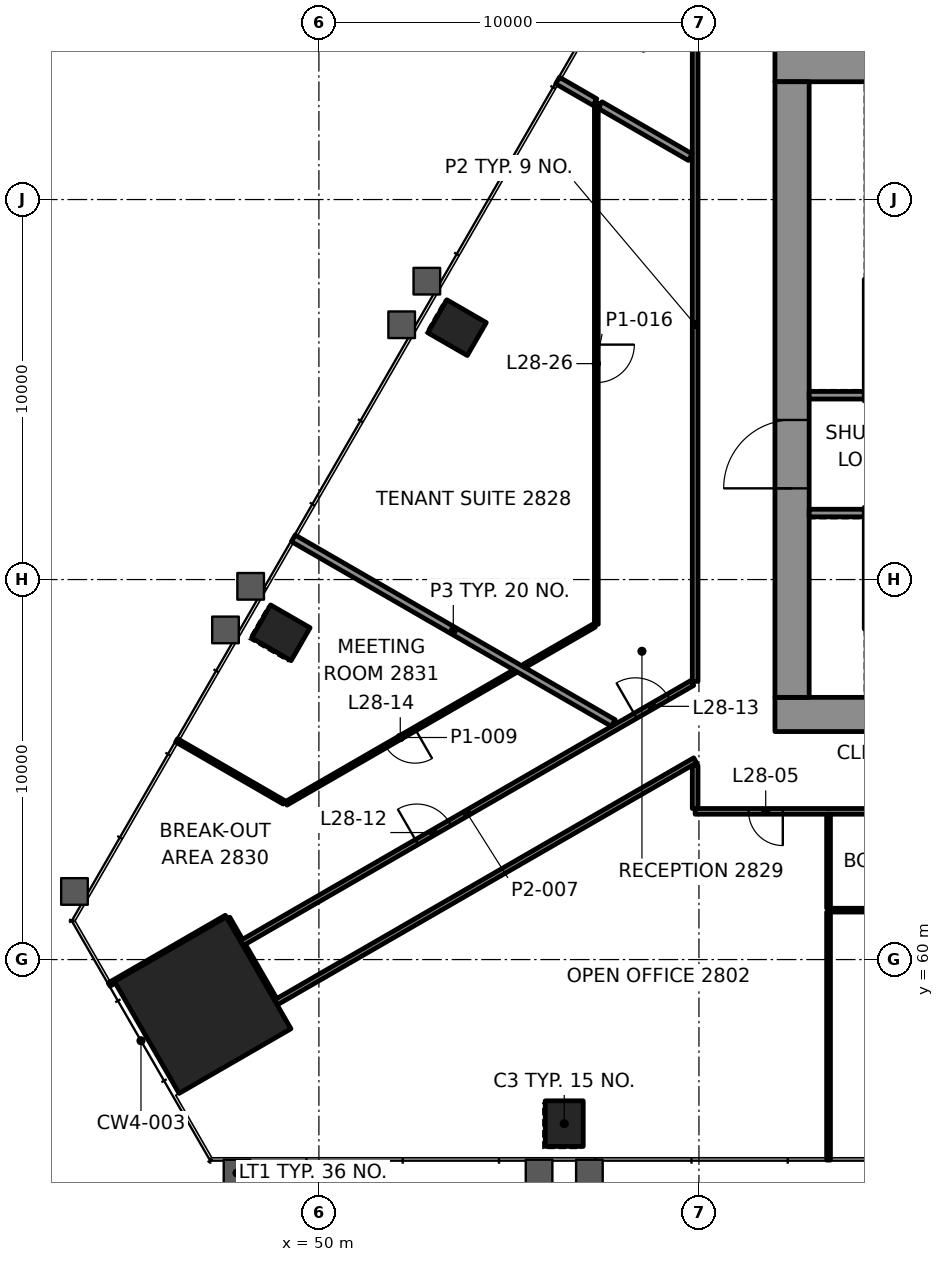
"""IFC4 building model, lengths in metres.
Left out: names, types, materials, properties, quantities, classifications, styles, units other than length and angle.
Written with IfcOpenShell. Run it as: python <this file> out.ifc"""

import sys

from ifc_helpers import new_model, si_unit, direction, frame, frame_2d, origin, origin_2d, place, context, subcontext, project, spatial, rectangle, extrude, element, fill, save


model = new_model("IFC4")
c1 = context("Model", 3, precision=1e-05, world=origin(), true_north=direction((0.0, 1.0)))
c2 = subcontext(c1, "Body", "Model", "MODEL_VIEW")
j1 = project(units=[si_unit("LENGTHUNIT", "METRE"), si_unit("PLANEANGLEUNIT", "RADIAN")], contexts=[c1])
p1 = place(None, origin())
s1 = spatial("IfcSite", under=j1, at=p1, CompositionType="ELEMENT")
p2 = place(p1, origin())
s2 = spatial("IfcBuilding", under=s1, at=p2, CompositionType="ELEMENT")
p3 = place(p2, frame((0.0, 0.0, 124.0)))
s3 = spatial("IfcBuildingStorey", under=s2, at=p3, CompositionType="ELEMENT", Elevation=124.0)
p4 = place(p3, frame((46.942, 58.801, 0.0), z_axis=(0.0, 0.0, 1.0), x_axis=(0.5, -0.866025403784, 0.0)))
e1 = element("IfcColumn", 1, at=p4, inside=s3, PredefinedType="COLUMN", context=c2, shape_type="SweptSolid", body=[
    extrude(rectangle(XDim=3.4, YDim=3.4, at=origin_2d()), origin(), (0.0, 0.0, 1.0), 4.2),
])
for number, where, z_axis, x_axis in (
    (2, (56.455, 55.683, -0.0), (0.0, 0.0, 1.0), (1.0, 0.0, 0.0)),
    (3, (53.635, 76.628, -0.0), (0.0, 0.0, 1.0), (-0.5, -0.866, 0.0)),
    (4, (48.999, 68.598, -0.0), (0.0, 0.0, 1.0), (-0.5, -0.866, 0.0)),
):
    element("IfcColumn", number, at=place(p3, frame(where, z_axis=z_axis, x_axis=x_axis)), inside=s3, PredefinedType="COLUMN", context=c2, shape_type="SweptSolid", body=[
        extrude(rectangle(XDim=1.0, YDim=1.2, at=origin_2d()), origin(), (0.0, 0.0, 1.0), 4.2),
    ])
p5 = place(p3, frame((62.0, 66.45, 0.0), z_axis=(0.0, 0.0, 1.0), x_axis=(1.0, 0.0, 0.0)))
e5 = element("IfcWall", 5, at=p5, inside=s3, PredefinedType="SHEAR", context=c2, shape_type="SweptSolid", body=[
    extrude(rectangle(XDim=26.0, YDim=0.9, at=frame_2d((13.0, 0.0))), origin(), (0.0, 0.0, 1.0), 4.0),
])
p6 = place(p5, frame((3.45, 0.0, 0.0)))
e6 = element("IfcOpeningElement", 6, at=p6, cuts=e5, PredefinedType="OPENING", context=c2, shape_type="SweptSolid", body=[
    extrude(rectangle(XDim=0.9, YDim=2.1, at=frame_2d((0.45, 1.05))), frame((0.0, 0.46, 0.0), z_axis=(0.0, -1.0, 0.0), x_axis=(1.0, 0.0, 0.0)), (0.0, 0.0, 1.0), 0.92),
])
p7 = place(p5, frame((6.425, 0.0, 0.0)))
e7 = element("IfcOpeningElement", 7, at=p7, cuts=e5, PredefinedType="OPENING", context=c2, shape_type="SweptSolid", body=[
    extrude(rectangle(XDim=0.9, YDim=2.1, at=frame_2d((0.45, 1.05))), frame((0.0, 0.46, 0.0), z_axis=(0.0, -1.0, 0.0), x_axis=(1.0, 0.0, 0.0)), (0.0, 0.0, 1.0), 0.92),
])
p8 = place(p5, frame((9.4, 0.0, 0.0)))
e8 = element("IfcOpeningElement", 8, at=p8, cuts=e5, PredefinedType="OPENING", context=c2, shape_type="SweptSolid", body=[
    extrude(rectangle(XDim=0.9, YDim=2.1, at=frame_2d((0.45, 1.05))), frame((0.0, 0.46, 0.0), z_axis=(0.0, -1.0, 0.0), x_axis=(1.0, 0.0, 0.0)), (0.0, 0.0, 1.0), 0.92),
])
p9 = place(p5, frame((14.262, 0.0, 0.0)))
e9 = element("IfcOpeningElement", 9, at=p9, cuts=e5, PredefinedType="OPENING", context=c2, shape_type="SweptSolid", body=[
    extrude(rectangle(XDim=0.9, YDim=2.1, at=frame_2d((0.45, 1.05))), frame((0.0, 0.46, 0.0), z_axis=(0.0, -1.0, 0.0), x_axis=(1.0, 0.0, 0.0)), (0.0, 0.0, 1.0), 0.92),
])
p10 = place(p5, frame((21.188, 0.0, 0.0)))
e10 = element("IfcOpeningElement", 10, at=p10, cuts=e5, PredefinedType="OPENING", context=c2, shape_type="SweptSolid", body=[
    extrude(rectangle(XDim=0.9, YDim=2.1, at=frame_2d((0.45, 1.05))), frame((0.0, 0.46, 0.0), z_axis=(0.0, -1.0, 0.0), x_axis=(1.0, 0.0, 0.0)), (0.0, 0.0, 1.0), 0.92),
])
p11 = place(p3, frame((62.0, 83.55, 0.0), z_axis=(0.0, 0.0, 1.0), x_axis=(1.0, 0.0, 0.0)))
e11 = element("IfcWall", 11, at=p11, inside=s3, PredefinedType="SHEAR", context=c2, shape_type="SweptSolid", body=[
    extrude(rectangle(XDim=26.0, YDim=0.9, at=frame_2d((13.0, 0.0))), origin(), (0.0, 0.0, 1.0), 4.0),
])
p12 = place(p11, frame((5.695, 0.0, 0.0)))
e12 = element("IfcOpeningElement", 12, at=p12, cuts=e11, PredefinedType="OPENING", context=c2, shape_type="SweptSolid", body=[
    extrude(rectangle(XDim=1.0, YDim=2.1, at=frame_2d((0.5, 1.05))), frame((0.0, 0.46, 0.0), z_axis=(0.0, -1.0, 0.0), x_axis=(1.0, 0.0, 0.0)), (0.0, 0.0, 1.0), 0.92),
])
p13 = place(p11, frame((19.505, 0.0, 0.0)))
e13 = element("IfcOpeningElement", 13, at=p13, cuts=e11, PredefinedType="OPENING", context=c2, shape_type="SweptSolid", body=[
    extrude(rectangle(XDim=1.0, YDim=2.1, at=frame_2d((0.5, 1.05))), frame((0.0, 0.46, 0.0), z_axis=(0.0, -1.0, 0.0), x_axis=(1.0, 0.0, 0.0)), (0.0, 0.0, 1.0), 0.92),
])
p14 = place(p11, frame((3.45, 0.0, 0.0)))
e14 = element("IfcOpeningElement", 14, at=p14, cuts=e11, PredefinedType="OPENING", context=c2, shape_type="SweptSolid", body=[
    extrude(rectangle(XDim=0.9, YDim=2.1, at=frame_2d((0.45, 1.05))), frame((0.0, 0.46, 0.0), z_axis=(0.0, -1.0, 0.0), x_axis=(1.0, 0.0, 0.0)), (0.0, 0.0, 1.0), 0.92),
])
p15 = place(p11, frame((12.65, 0.0, 0.0)))
e15 = element("IfcOpeningElement", 15, at=p15, cuts=e11, PredefinedType="OPENING", context=c2, shape_type="SweptSolid", body=[
    extrude(rectangle(XDim=0.9, YDim=2.1, at=frame_2d((0.45, 1.05))), frame((0.0, 0.46, 0.0), z_axis=(0.0, -1.0, 0.0), x_axis=(1.0, 0.0, 0.0)), (0.0, 0.0, 1.0), 0.92),
])
p16 = place(p11, frame((22.55, 0.0, 0.0)))
e16 = element("IfcOpeningElement", 16, at=p16, cuts=e11, PredefinedType="OPENING", context=c2, shape_type="SweptSolid", body=[
    extrude(rectangle(XDim=0.9, YDim=2.1, at=frame_2d((0.45, 1.05))), frame((0.0, 0.46, 0.0), z_axis=(0.0, -1.0, 0.0), x_axis=(1.0, 0.0, 0.0)), (0.0, 0.0, 1.0), 0.92),
])
p17 = place(p3, frame((62.45, 66.9, 0.0), z_axis=(0.0, 0.0, 1.0), x_axis=(0.0, 1.0, 0.0)))
e17 = element("IfcWall", 17, at=p17, inside=s3, PredefinedType="SHEAR", context=c2, shape_type="SweptSolid", body=[
    extrude(rectangle(XDim=16.2, YDim=0.9, at=frame_2d((8.1, 0.0))), origin(), (0.0, 0.0, 1.0), 4.0),
])
p18 = place(p17, frame((5.5, 0.0, 0.0)))
e18 = element("IfcOpeningElement", 18, at=p18, cuts=e17, PredefinedType="OPENING", context=c2, shape_type="SweptSolid", body=[
    extrude(rectangle(XDim=1.8, YDim=2.1, at=frame_2d((0.9, 1.05))), frame((0.0, 0.46, 0.0), z_axis=(0.0, -1.0, 0.0), x_axis=(1.0, 0.0, 0.0)), (0.0, 0.0, 1.0), 0.92),
])
for number, where, z_axis, x_axis in (
    (19, (64.35, 68.85, 0.0), (0.0, 0.0, 1.0), (1.0, 0.0, 0.0)),
    (20, (64.35, 71.75, 0.0), (0.0, 0.0, 1.0), (1.0, 0.0, 0.0)),
    (21, (64.35, 74.85, 0.0), (0.0, 0.0, 1.0), (1.0, 0.0, 0.0)),
):
    element("IfcWall", number, at=place(p3, frame(where, z_axis=z_axis, x_axis=x_axis)), inside=s3, PredefinedType="SHEAR", context=c2, shape_type="SweptSolid", body=[
        extrude(rectangle(XDim=3.1, YDim=0.3, at=frame_2d((1.55, 0.0))), origin(), (0.0, 0.0, 1.0), 4.0),
    ])
for number, where, z_axis, x_axis in (
    (22, (64.5, 69.0, 0.0), (0.0, 0.0, 1.0), (0.0, 1.0, 0.0)),
    (23, (64.5, 75.0, 0.0), (0.0, 0.0, 1.0), (0.0, 1.0, 0.0)),
):
    element("IfcWall", number, at=place(p3, frame(where, z_axis=z_axis, x_axis=x_axis)), inside=s3, PredefinedType="SHEAR", context=c2, shape_type="SweptSolid", body=[
        extrude(rectangle(XDim=2.6, YDim=0.3, at=frame_2d((1.3, 0.0))), origin(), (0.0, 0.0, 1.0), 4.0),
    ])
p19 = place(p3, frame((64.35, 77.75, 0.0), z_axis=(0.0, 0.0, 1.0), x_axis=(1.0, 0.0, 0.0)))
e24 = element("IfcWall", 24, at=p19, inside=s3, PredefinedType="SHEAR", context=c2, shape_type="SweptSolid", body=[
    extrude(rectangle(XDim=22.75, YDim=0.3, at=frame_2d((11.375, 0.0))), origin(), (0.0, 0.0, 1.0), 4.0),
])
p20 = place(p19, frame((3.345, 0.0, 0.0)))
e25 = element("IfcOpeningElement", 25, at=p20, cuts=e24, PredefinedType="OPENING", context=c2, shape_type="SweptSolid", body=[
    extrude(rectangle(XDim=1.0, YDim=2.1, at=frame_2d((0.5, 1.05))), frame((0.0, 0.16, 0.0), z_axis=(0.0, -1.0, 0.0), x_axis=(1.0, 0.0, 0.0)), (0.0, 0.0, 1.0), 0.32),
])
p21 = place(p3, frame((63.41, 61.3, 0.0), z_axis=(0.0, 0.0, 1.0), x_axis=(1.0, 0.0, 0.0)))
e26 = element("IfcWall", 26, at=p21, inside=s3, PredefinedType="PARTITIONING", context=c2, shape_type="SweptSolid", body=[
    extrude(rectangle(XDim=28.319, YDim=0.1, at=frame_2d((14.16, 0.0))), origin(), (0.0, 0.0, 1.0), 3.4),
])
p22 = place(p21, frame((7.613, 0.0, 0.0)))
e27 = element("IfcOpeningElement", 27, at=p22, cuts=e26, PredefinedType="OPENING", context=c2, shape_type="SweptSolid", body=[
    extrude(rectangle(XDim=1.2, YDim=2.1, at=frame_2d((0.6, 1.05))), frame((0.0, 0.06, 0.0), z_axis=(0.0, -1.0, 0.0), x_axis=(1.0, 0.0, 0.0)), (0.0, 0.0, 1.0), 0.12),
])
p23 = place(p21, frame((21.573, 0.0, 0.0)))
e28 = element("IfcOpeningElement", 28, at=p23, cuts=e26, PredefinedType="OPENING", context=c2, shape_type="SweptSolid", body=[
    extrude(rectangle(XDim=1.2, YDim=2.1, at=frame_2d((0.6, 1.05))), frame((0.0, 0.06, 0.0), z_axis=(0.0, -1.0, 0.0), x_axis=(1.0, 0.0, 0.0)), (0.0, 0.0, 1.0), 0.12),
])
p24 = place(p3, frame((90.1, 63.9, 0.0), z_axis=(0.0, 0.0, 1.0), x_axis=(-1.0, 0.0, 0.0)))
e29 = element("IfcWall", 29, at=p24, inside=s3, PredefinedType="PARTITIONING", context=c2, shape_type="SweptSolid", body=[
    extrude(rectangle(XDim=30.2, YDim=0.15, at=frame_2d((15.1, 0.0))), origin(), (0.0, 0.0, 1.0), 3.4),
])
p25 = place(p24, frame((4.833, 0.0, 0.0)))
e30 = element("IfcOpeningElement", 30, at=p25, cuts=e29, PredefinedType="OPENING", context=c2, shape_type="SweptSolid", body=[
    extrude(rectangle(XDim=1.0, YDim=2.1, at=frame_2d((0.5, 1.05))), frame((0.0, 0.085, 0.0), z_axis=(0.0, -1.0, 0.0), x_axis=(1.0, 0.0, 0.0)), (0.0, 0.0, 1.0), 0.17),
])
p26 = place(p24, frame((18.077, 0.0, 0.0)))
e31 = element("IfcOpeningElement", 31, at=p26, cuts=e29, PredefinedType="OPENING", context=c2, shape_type="SweptSolid", body=[
    extrude(rectangle(XDim=1.0, YDim=2.1, at=frame_2d((0.5, 1.05))), frame((0.0, 0.085, 0.0), z_axis=(0.0, -1.0, 0.0), x_axis=(1.0, 0.0, 0.0)), (0.0, 0.0, 1.0), 0.17),
])
p27 = place(p24, frame((27.893, 0.0, 0.0)))
e32 = element("IfcOpeningElement", 32, at=p27, cuts=e29, PredefinedType="OPENING", context=c2, shape_type="SweptSolid", body=[
    extrude(rectangle(XDim=0.9, YDim=2.1, at=frame_2d((0.45, 1.05))), frame((0.0, 0.085, 0.0), z_axis=(0.0, -1.0, 0.0), x_axis=(1.0, 0.0, 0.0)), (0.0, 0.0, 1.0), 0.17),
])
p28 = place(p3, frame((48.865, 58.872, 0.0), z_axis=(0.0, 0.0, 1.0), x_axis=(0.866019033468, 0.500011033549, 0.0)))
e33 = element("IfcWall", 33, at=p28, inside=s3, PredefinedType="PARTITIONING", context=c2, shape_type="SweptSolid", body=[
    extrude(rectangle(XDim=12.742, YDim=0.15, at=frame_2d((6.371, 0.0))), origin(), (0.0, 0.0, 1.0), 3.247),
])
p29 = place(p3, frame((47.967, 60.432, 0.0), z_axis=(0.0, 0.0, 1.0), x_axis=(0.866021388453, 0.500006954693, 0.0)))
e34 = element("IfcWall", 34, at=p29, inside=s3, PredefinedType="PARTITIONING", context=c2, shape_type="SweptSolid", body=[
    extrude(rectangle(XDim=13.693, YDim=0.15, at=frame_2d((6.846, 0.0))), origin(), (0.0, 0.0, 1.0), 3.4),
])
p30 = place(p29, frame((5.321, 0.0, 0.0)))
e35 = element("IfcOpeningElement", 35, at=p30, cuts=e34, PredefinedType="OPENING", context=c2, shape_type="SweptSolid", body=[
    extrude(rectangle(XDim=1.0, YDim=2.1, at=frame_2d((0.5, 1.05))), frame((0.0, 0.085, 0.0), z_axis=(0.0, -1.0, 0.0), x_axis=(1.0, 0.0, 0.0)), (0.0, 0.0, 1.0), 0.17),
])
p31 = place(p29, frame((11.964, 0.0, 0.0)))
e36 = element("IfcOpeningElement", 36, at=p31, cuts=e34, PredefinedType="OPENING", context=c2, shape_type="SweptSolid", body=[
    extrude(rectangle(XDim=1.0, YDim=2.1, at=frame_2d((0.5, 1.05))), frame((0.0, 0.085, 0.0), z_axis=(0.0, -1.0, 0.0), x_axis=(1.0, 0.0, 0.0)), (0.0, 0.0, 1.0), 0.17),
])
p32 = place(p3, frame((44.481, 59.343, 0.0), z_axis=(0.0, 0.0, 1.0), x_axis=(0.866008413041, 0.500029427677, 0.0)))
e37 = element("IfcWall", 37, at=p32, inside=s3, PredefinedType="PARTITIONING", context=c2, shape_type="SweptSolid", body=[
    extrude(rectangle(XDim=3.557, YDim=0.1, at=frame_2d((1.778, 0.0))), origin(), (0.0, 0.0, 1.0), 3.4),
])
p33 = place(p3, frame((55.148, 67.58, 0.0), z_axis=(0.0, 0.0, 1.0), x_axis=(-0.866019333862, -0.500010513267, 0.0)))
e38 = element("IfcWall", 38, at=p33, inside=s3, PredefinedType="PARTITIONING", context=c2, shape_type="SweptSolid", body=[
    extrude(rectangle(XDim=6.945, YDim=0.1, at=frame_2d((3.473, 0.0))), origin(), (0.0, 0.0, 1.0), 3.4),
])
p34 = place(p33, frame((3.023, 0.0, 0.0)))
e39 = element("IfcOpeningElement", 39, at=p34, cuts=e38, PredefinedType="OPENING", context=c2, shape_type="SweptSolid", body=[
    extrude(rectangle(XDim=0.9, YDim=2.1, at=frame_2d((0.45, 1.05))), frame((0.0, 0.06, 0.0), z_axis=(0.0, -1.0, 0.0), x_axis=(1.0, 0.0, 0.0)), (0.0, 0.0, 1.0), 0.12),
])
p35 = place(p3, frame((63.41, 54.723, 0.0), z_axis=(0.0, 0.0, 1.0), x_axis=(0.0, 1.0, 0.0)))
e40 = element("IfcWall", 40, at=p35, inside=s3, PredefinedType="PARTITIONING", context=c2, shape_type="SweptSolid", body=[
    extrude(rectangle(XDim=6.527, YDim=0.1, at=frame_2d((3.264, 0.0))), origin(), (0.0, 0.0, 1.0), 3.165),
])
p36 = place(p3, frame((59.9, 63.976, 0.0), z_axis=(0.0, 0.0, 1.0), x_axis=(0.0, 1.0, 0.0)))
e41 = element("IfcWall", 41, at=p36, inside=s3, PredefinedType="PARTITIONING", context=c2, shape_type="SweptSolid", body=[
    extrude(rectangle(XDim=1.131, YDim=0.15, at=frame_2d((0.565, 0.0))), origin(), (0.0, 0.0, 1.0), 3.247),
])
p37 = place(p3, frame((59.9, 67.321, 0.0), z_axis=(0.0, 0.0, 1.0), x_axis=(0.0, 1.0, 0.0)))
e42 = element("IfcWall", 42, at=p37, inside=s3, PredefinedType="PARTITIONING", context=c2, shape_type="SweptSolid", body=[
    extrude(rectangle(XDim=18.778, YDim=0.15, at=frame_2d((9.389, 0.0))), origin(), (0.0, 0.0, 1.0), 3.4),
])
p38 = place(p3, frame((57.3, 82.542, 0.0), z_axis=(0.0, 0.0, 1.0), x_axis=(0.0, -1.0, 0.0)))
e43 = element("IfcWall", 43, at=p38, inside=s3, PredefinedType="PARTITIONING", context=c2, shape_type="SweptSolid", body=[
    extrude(rectangle(XDim=13.72, YDim=0.1, at=frame_2d((6.86, 0.0))), origin(), (0.0, 0.0, 1.0), 3.4),
])
p39 = place(p38, frame((6.36, 0.0, 0.0)))
e44 = element("IfcOpeningElement", 44, at=p39, cuts=e43, PredefinedType="OPENING", context=c2, shape_type="SweptSolid", body=[
    extrude(rectangle(XDim=1.0, YDim=2.1, at=frame_2d((0.5, 1.05))), frame((0.0, 0.06, 0.0), z_axis=(0.0, -1.0, 0.0), x_axis=(1.0, 0.0, 0.0)), (0.0, 0.0, 1.0), 0.12),
])
p40 = place(p3, frame((48.826, 58.937, 0.0), z_axis=(0.0, 0.0, 1.0), x_axis=(-0.499991515992, 0.866030301974, 0.0)))
e45 = element("IfcWall", 45, at=p40, inside=s3, PredefinedType="PARTITIONING", context=c2, shape_type="SweptSolid", body=[
    extrude(rectangle(XDim=1.649, YDim=0.15, at=frame_2d((0.825, 0.0))), origin(), (0.0, 0.0, 1.0), 3.247),
])
p41 = place(p3, frame((59.773, 81.115, 0.0), z_axis=(0.0, 0.0, 1.0), x_axis=(-0.86604168154, 0.499971805041, 0.0)))
e46 = element("IfcWall", 46, at=p41, inside=s3, PredefinedType="PARTITIONING", context=c2, shape_type="SweptSolid", body=[
    extrude(rectangle(XDim=2.74, YDim=0.2, at=frame_2d((1.37, 0.0))), origin(), (0.0, 0.0, 1.0), 3.4),
])
p42 = place(p3, frame((57.746, 66.224, 0.0), z_axis=(0.0, 0.0, 1.0), x_axis=(-0.866017068849, 0.500014436255, 0.0)))
e47 = element("IfcWall", 47, at=p42, inside=s3, PredefinedType="PARTITIONING", context=c2, shape_type="SweptSolid", body=[
    extrude(rectangle(XDim=9.723, YDim=0.2, at=frame_2d((4.861, 0.0))), origin(), (0.0, 0.0, 1.0), 3.165),
])
p43 = place(p3, frame((49.083, 64.136, 0.0), z_axis=(0.0, 0.0, 1.0), x_axis=(-0.866048593798, 0.499959831567, 0.0)))
e48 = element("IfcWall", 48, at=p43, inside=s3, PredefinedType="PARTITIONING", context=c2, shape_type="SweptSolid", body=[
    extrude(rectangle(XDim=3.264, YDim=0.1, at=frame_2d((1.632, 0.0))), origin(), (0.0, 0.0, 1.0), 3.4),
])
p44 = place(p3, frame((47.927, 60.495, 0.0), z_axis=(0.0, 0.0, 1.0), x_axis=(-0.5000475079, 0.865997973348, 0.0)))
e49 = element("IfcWall", 49, at=p44, inside=s3, PredefinedType="PARTITIONING", context=c2, shape_type="SweptSolid", body=[
    extrude(rectangle(XDim=0.672, YDim=0.15, at=frame_2d((0.336, 0.0))), origin(), (0.0, 0.0, 1.0), 3.4),
])
p45 = place(p3, frame((55.398, 67.724, 0.0), z_axis=(0.0, 0.0, 1.0), x_axis=(0.866063918387, 0.499933284817, 0.0)))
e50 = element("IfcWall", 50, at=p45, inside=s3, PredefinedType="PARTITIONING", context=c2, shape_type="SweptSolid", body=[
    extrude(rectangle(XDim=2.138, YDim=0.1, at=frame_2d((1.069, 0.0))), origin(), (0.0, 0.0, 1.0), 3.4),
])
p46 = place(p3, frame((57.263, 82.564, 0.0), z_axis=(0.0, 0.0, 1.0), x_axis=(-0.8660349869, 0.499983401189, 0.0)))
e51 = element("IfcWall", 51, at=p46, inside=s3, PredefinedType="PARTITIONING", context=c2, shape_type="SweptSolid", body=[
    extrude(rectangle(XDim=1.134, YDim=0.2, at=frame_2d((0.567, 0.0))), origin(), (0.0, 0.0, 1.0), 3.165),
])
p47 = place(p3, frame((63.41, 61.35, 0.0), z_axis=(0.0, 0.0, 1.0), x_axis=(0.0, 1.0, 0.0)))
e52 = element("IfcWall", 52, at=p47, inside=s3, PredefinedType="PARTITIONING", context=c2, shape_type="SweptSolid", body=[
    extrude(rectangle(XDim=2.475, YDim=0.1, at=frame_2d((1.237, 0.0))), origin(), (0.0, 0.0, 1.0), 3.4),
])
for number, where, z_axis, x_axis in (
    (53, (62.9, 71.75, 0.0), (0.0, 0.0, 1.0), (1.0, 0.0, 0.0)),
    (54, (62.9, 74.85, 0.0), (0.0, 0.0, 1.0), (1.0, 0.0, 0.0)),
):
    element("IfcWall", number, at=place(p3, frame(where, z_axis=z_axis, x_axis=x_axis)), inside=s3, PredefinedType="PARTITIONING", context=c2, shape_type="SweptSolid", body=[
        extrude(rectangle(XDim=1.45, YDim=0.2, at=frame_2d((0.725, 0.0))), origin(), (0.0, 0.0, 1.0), 4.0),
    ])
p48 = place(p27, origin())
e55 = element("IfcDoor", 55, at=p48, inside=s3, OperationType="SINGLE_SWING_RIGHT", PredefinedType="DOOR", context=c2, shape_type="SweptSolid", body=[
    extrude(rectangle(XDim=0.9, YDim=2.1, at=frame_2d((0.45, 1.05))), frame((0.0, 0.025, 0.0), z_axis=(0.0, -1.0, 0.0), x_axis=(1.0, 0.0, 0.0)), (0.0, 0.0, 1.0), 0.05),
])
fill(e32, e55)
p49 = place(p30, origin())
e56 = element("IfcDoor", 56, at=p49, inside=s3, OperationType="SINGLE_SWING_LEFT", PredefinedType="DOOR", context=c2, shape_type="SweptSolid", body=[
    extrude(rectangle(XDim=1.0, YDim=2.1, at=frame_2d((0.5, 1.05))), frame((0.0, 0.025, 0.0), z_axis=(0.0, -1.0, 0.0), x_axis=(1.0, 0.0, 0.0)), (0.0, 0.0, 1.0), 0.05),
])
fill(e35, e56)
p50 = place(p31, origin())
e57 = element("IfcDoor", 57, at=p50, inside=s3, OperationType="SINGLE_SWING_RIGHT", PredefinedType="DOOR", context=c2, shape_type="SweptSolid", body=[
    extrude(rectangle(XDim=1.0, YDim=2.1, at=frame_2d((0.5, 1.05))), frame((0.0, 0.025, 0.0), z_axis=(0.0, -1.0, 0.0), x_axis=(1.0, 0.0, 0.0)), (0.0, 0.0, 1.0), 0.05),
])
fill(e36, e57)
p51 = place(p34, origin())
e58 = element("IfcDoor", 58, at=p51, inside=s3, OperationType="SINGLE_SWING_LEFT", PredefinedType="DOOR", context=c2, shape_type="SweptSolid", body=[
    extrude(rectangle(XDim=0.9, YDim=2.1, at=frame_2d((0.45, 1.05))), frame((0.0, 0.025, 0.0), z_axis=(0.0, -1.0, 0.0), x_axis=(1.0, 0.0, 0.0)), (0.0, 0.0, 1.0), 0.05),
])
fill(e39, e58)
p52 = place(p39, origin())
e59 = element("IfcDoor", 59, at=p52, inside=s3, OperationType="SINGLE_SWING_RIGHT", PredefinedType="DOOR", context=c2, shape_type="SweptSolid", body=[
    extrude(rectangle(XDim=1.0, YDim=2.1, at=frame_2d((0.5, 1.05))), frame((0.0, 0.025, 0.0), z_axis=(0.0, -1.0, 0.0), x_axis=(1.0, 0.0, 0.0)), (0.0, 0.0, 1.0), 0.05),
])
fill(e44, e59)
p53 = place(p18, origin())
e60 = element("IfcDoor", 60, at=p53, inside=s3, OperationType="SINGLE_SWING_LEFT", PredefinedType="DOOR", context=c2, shape_type="SweptSolid", body=[
    extrude(rectangle(XDim=1.8, YDim=2.1, at=frame_2d((0.9, 1.05))), frame((0.0, 0.17, 0.0), z_axis=(0.0, -1.0, 0.0), x_axis=(1.0, 0.0, 0.0)), (0.0, 0.0, 1.0), 0.34),
])
fill(e18, e60)
save(model, sys.argv[1])
